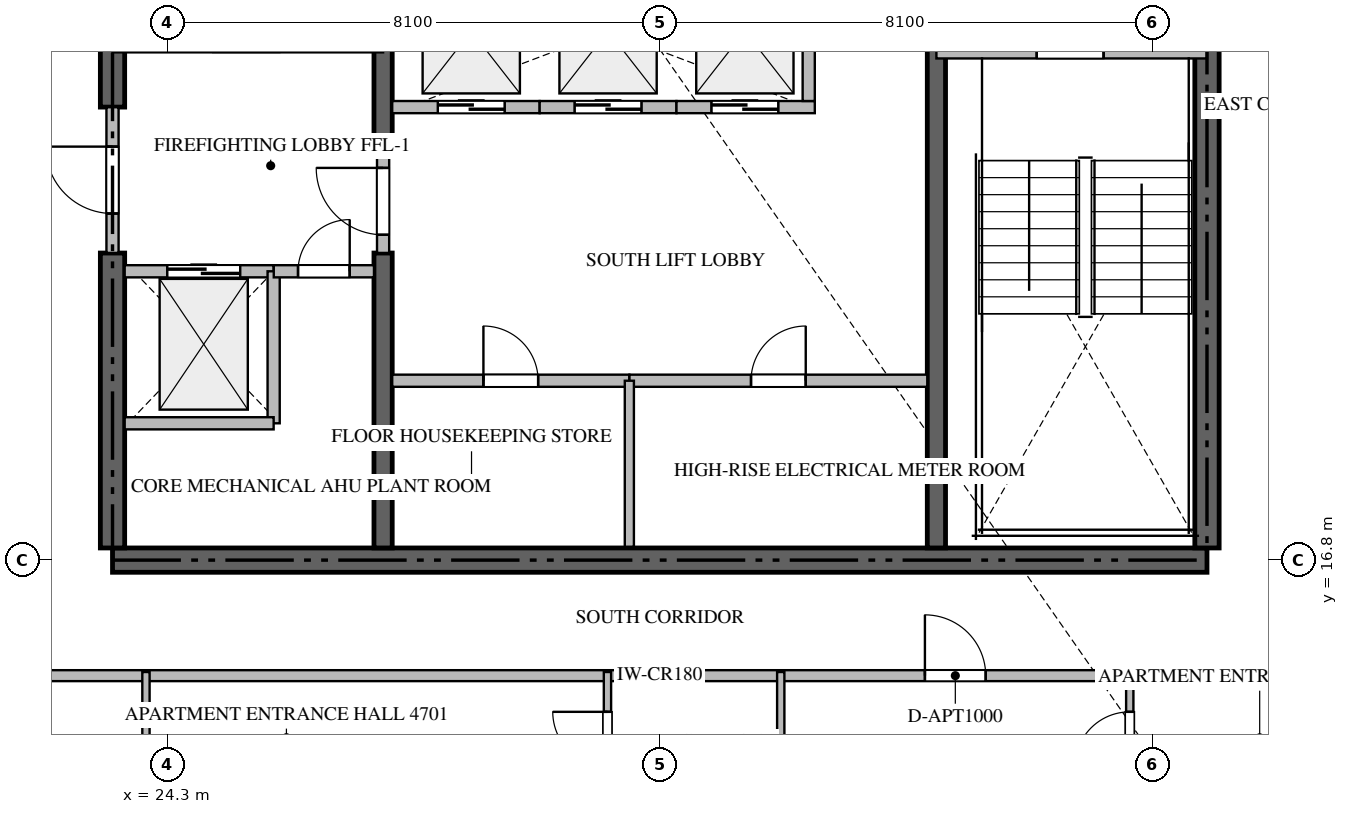
"""IFC4 building model, lengths in metres.
Left out: names, types, materials, properties, quantities, classifications, styles, units other than length and angle.
Written with IfcOpenShell. Run it as: python <this file> out.ifc"""

import sys

from ifc_helpers import new_model, si_unit, direction, frame, frame_2d, origin, place, context, subcontext, project, spatial, rectangle, extrude, source, transform, mapped, element, fill, save


model = new_model("IFC4")
c1 = context("Model", 3, precision=1e-05, world=origin(), true_north=direction((0.0, 1.0)))
c2 = subcontext(c1, "Body", "Model", "MODEL_VIEW")
j1 = project(units=[si_unit("LENGTHUNIT", "METRE"), si_unit("PLANEANGLEUNIT", "RADIAN")], contexts=[c1])
p1 = place(None, origin())
s1 = spatial("IfcSite", under=j1, at=p1, CompositionType="ELEMENT")
p2 = place(p1, origin())
s2 = spatial("IfcBuilding", under=s1, at=p2, CompositionType="ELEMENT")
p3 = place(p2, frame((0.0, 0.0, 187.65)))
s3 = spatial("IfcBuildingStorey", under=s2, at=p3, CompositionType="ELEMENT", Elevation=187.65)
p4 = place(p3, frame((23.4, 16.8, -0.26), z_axis=(0.0, 0.0, 1.0), x_axis=(1.0, 0.0, 0.0)))
e1 = element("IfcWall", 1, at=p4, inside=s3, PredefinedType="SHEAR", context=c2, shape_type="SweptSolid", body=[
    extrude(rectangle(XDim=18.0, YDim=0.4, at=frame_2d((9.0, 0.0))), origin(), (0.0, 0.0, 1.0), 3.748),
])
p5 = place(p3, frame((23.4, 17.0, -0.26), z_axis=(0.0, 0.0, 1.0), x_axis=(0.0, 1.0, 0.0)))
e2 = element("IfcWall", 2, at=p5, inside=s3, PredefinedType="SHEAR", context=c2, shape_type="SweptSolid", body=[
    extrude(rectangle(XDim=4.85, YDim=0.4, at=frame_2d((2.425, 0.0))), origin(), (0.0, 0.0, 1.0), 3.748),
])
p6 = place(p3, frame((23.4, 24.25, -0.26), z_axis=(0.0, 0.0, 1.0), x_axis=(0.0, 1.0, 0.0)))
e3 = element("IfcWall", 3, at=p6, inside=s3, PredefinedType="SHEAR", context=c2, shape_type="SweptSolid", body=[
    extrude(rectangle(XDim=9.15, YDim=0.4, at=frame_2d((4.575, 0.0))), origin(), (0.0, 0.0, 1.0), 3.748),
])
p7 = place(p3, frame((41.4, 17.0, -0.26), z_axis=(0.0, 0.0, 1.0), x_axis=(0.0, 1.0, 0.0)))
e4 = element("IfcWall", 4, at=p7, inside=s3, PredefinedType="SHEAR", context=c2, shape_type="SweptSolid", body=[
    extrude(rectangle(XDim=8.35, YDim=0.4, at=frame_2d((4.175, 0.0))), origin(), (0.0, 0.0, 1.0), 3.748),
])
p8 = place(p3, frame((27.85, 17.0, -0.26), z_axis=(0.0, 0.0, 1.0), x_axis=(0.0, 1.0, 0.0)))
e5 = element("IfcWall", 5, at=p8, inside=s3, PredefinedType="SHEAR", context=c2, shape_type="SweptSolid", body=[
    extrude(rectangle(XDim=4.85, YDim=0.3, at=frame_2d((2.425, 0.0))), origin(), (0.0, 0.0, 1.0), 3.748),
])
p9 = place(p3, frame((27.85, 23.55, -0.26), z_axis=(0.0, 0.0, 1.0), x_axis=(0.0, 1.0, 0.0)))
e6 = element("IfcWall", 6, at=p9, inside=s3, PredefinedType="SHEAR", context=c2, shape_type="SweptSolid", body=[
    extrude(rectangle(XDim=9.85, YDim=0.3, at=frame_2d((4.925, 0.0))), origin(), (0.0, 0.0, 1.0), 3.748),
])
p10 = place(p3, frame((36.95, 17.0, -0.26), z_axis=(0.0, 0.0, 1.0), x_axis=(0.0, 1.0, 0.0)))
e7 = element("IfcWall", 7, at=p10, inside=s3, PredefinedType="SHEAR", context=c2, shape_type="SweptSolid", body=[
    extrude(rectangle(XDim=8.35, YDim=0.3, at=frame_2d((4.175, 0.0))), origin(), (0.0, 0.0, 1.0), 3.748),
])
p11 = place(p3, frame((36.95, 25.15, 0.0), z_axis=(0.0, 0.0, 1.0), x_axis=(1.0, 0.0, 0.0)))
e8 = element("IfcWall", 8, at=p11, inside=s3, PredefinedType="STANDARD", context=c2, shape_type="SweptSolid", body=[
    extrude(rectangle(XDim=4.45, YDim=0.2, at=frame_2d((2.225, 0.0))), origin(), (0.0, 0.0, 1.0), 3.49),
])
p12 = place(p11, frame((1.65, 0.0, 0.0)))
e9 = element("IfcOpeningElement", 9, at=p12, cuts=e8, PredefinedType="OPENING", context=c2, shape_type="SweptSolid", body=[
    extrude(rectangle(XDim=1.1, YDim=2.15, at=frame_2d((0.55, 1.075))), frame((0.0, 0.11, 0.0), z_axis=(0.0, -1.0, 0.0), x_axis=(1.0, 0.0, 0.0)), (0.0, 0.0, 1.0), 0.22),
])
p13 = place(p3, frame((23.6, 21.55, 0.0), z_axis=(0.0, 0.0, 1.0), x_axis=(1.0, 0.0, 0.0)))
e10 = element("IfcWall", 10, at=p13, inside=s3, PredefinedType="STANDARD", context=c2, shape_type="SweptSolid", body=[
    extrude(rectangle(XDim=2.45, YDim=0.2, at=frame_2d((1.225, 0.0))), origin(), (0.0, 0.0, 1.0), 3.49),
])
p14 = place(p13, frame((0.7, 0.0, 0.0)))
e11 = element("IfcOpeningElement", 11, at=p14, cuts=e10, PredefinedType="OPENING", context=c2, shape_type="SweptSolid", body=[
    extrude(rectangle(XDim=1.2, YDim=2.2, at=frame_2d((0.6, 1.1))), frame((0.0, 0.11, 0.0), z_axis=(0.0, -1.0, 0.0), x_axis=(1.0, 0.0, 0.0)), (0.0, 0.0, 1.0), 0.22),
])
p15 = place(p3, frame((28.0, 24.25, 0.0), z_axis=(0.0, 0.0, 1.0), x_axis=(1.0, 0.0, 0.0)))
e12 = element("IfcWall", 12, at=p15, inside=s3, PredefinedType="STANDARD", context=c2, shape_type="SweptSolid", body=[
    extrude(rectangle(XDim=2.425, YDim=0.2, at=frame_2d((1.212, 0.0))), origin(), (0.0, 0.0, 1.0), 3.49),
])
p16 = place(p15, frame((0.75, 0.0, 0.0)))
e13 = element("IfcOpeningElement", 13, at=p16, cuts=e12, PredefinedType="OPENING", context=c2, shape_type="SweptSolid", body=[
    extrude(rectangle(XDim=1.1, YDim=2.2, at=frame_2d((0.55, 1.1))), frame((0.0, 0.11, 0.0), z_axis=(0.0, -1.0, 0.0), x_axis=(1.0, 0.0, 0.0)), (0.0, 0.0, 1.0), 0.22),
])
p17 = place(p3, frame((30.425, 24.25, 0.0), z_axis=(0.0, 0.0, 1.0), x_axis=(1.0, 0.0, 0.0)))
e14 = element("IfcWall", 14, at=p17, inside=s3, PredefinedType="STANDARD", context=c2, shape_type="SweptSolid", body=[
    extrude(rectangle(XDim=2.25, YDim=0.2, at=frame_2d((1.125, 0.0))), origin(), (0.0, 0.0, 1.0), 3.49),
])
p18 = place(p17, frame((0.575, 0.0, 0.0)))
e15 = element("IfcOpeningElement", 15, at=p18, cuts=e14, PredefinedType="OPENING", context=c2, shape_type="SweptSolid", body=[
    extrude(rectangle(XDim=1.1, YDim=2.2, at=frame_2d((0.55, 1.1))), frame((0.0, 0.11, 0.0), z_axis=(0.0, -1.0, 0.0), x_axis=(1.0, 0.0, 0.0)), (0.0, 0.0, 1.0), 0.22),
])
p19 = place(p3, frame((32.675, 24.25, 0.0), z_axis=(0.0, 0.0, 1.0), x_axis=(1.0, 0.0, 0.0)))
e16 = element("IfcWall", 16, at=p19, inside=s3, PredefinedType="STANDARD", context=c2, shape_type="SweptSolid", body=[
    extrude(rectangle(XDim=2.275, YDim=0.2, at=frame_2d((1.137, 0.0))), origin(), (0.0, 0.0, 1.0), 3.49),
])
p20 = place(p19, frame((0.575, 0.0, 0.0)))
e17 = element("IfcOpeningElement", 17, at=p20, cuts=e16, PredefinedType="OPENING", context=c2, shape_type="SweptSolid", body=[
    extrude(rectangle(XDim=1.1, YDim=2.2, at=frame_2d((0.55, 1.1))), frame((0.0, 0.11, 0.0), z_axis=(0.0, -1.0, 0.0), x_axis=(1.0, 0.0, 0.0)), (0.0, 0.0, 1.0), 0.22),
])
for number, where, z_axis, x_axis in (
    (18, (34.85, 24.35, 0.0), (0.0, 0.0, 1.0), (0.0, 1.0, 0.0)),
    (19, (26.05, 19.05, 0.0), (0.0, 0.0, 1.0), (0.0, 1.0, 0.0)),
):
    element("IfcWall", number, at=place(p3, frame(where, z_axis=z_axis, x_axis=x_axis)), inside=s3, PredefinedType="STANDARD", context=c2, shape_type="SweptSolid", body=[
        extrude(rectangle(XDim=2.5, YDim=0.2, at=frame_2d((1.25, 0.0))), origin(), (0.0, 0.0, 1.0), 3.49),
    ])
p21 = place(p3, frame((23.6, 19.05, 0.0), z_axis=(0.0, 0.0, 1.0), x_axis=(1.0, 0.0, 0.0)))
e20 = element("IfcWall", 20, at=p21, inside=s3, PredefinedType="STANDARD", context=c2, shape_type="SweptSolid", body=[
    extrude(rectangle(XDim=2.45, YDim=0.2, at=frame_2d((1.225, 0.0))), origin(), (0.0, 0.0, 1.0), 3.49),
])
p22 = place(p3, frame((26.052, 21.55, 0.0), z_axis=(0.0, 0.0, 1.0), x_axis=(1.0, 0.0, 0.0)))
e21 = element("IfcWall", 21, at=p22, inside=s3, PredefinedType="STANDARD", context=c2, shape_type="SweptSolid", body=[
    extrude(rectangle(XDim=1.648, YDim=0.2, at=frame_2d((0.824, 0.0))), origin(), (0.0, 0.0, 1.0), 3.49),
])
p23 = place(p22, frame((0.399, 0.0, 0.0)))
e22 = element("IfcOpeningElement", 22, at=p23, cuts=e21, PredefinedType="OPENING", context=c2, shape_type="SweptSolid", body=[
    extrude(rectangle(XDim=0.85, YDim=2.1, at=frame_2d((0.425, 1.05))), frame((0.0, 0.11, 0.0), z_axis=(0.0, -1.0, 0.0), x_axis=(1.0, 0.0, 0.0)), (0.0, 0.0, 1.0), 0.22),
])
p24 = place(p3, frame((23.4, 21.852, 0.0), z_axis=(0.0, 0.0, 1.0), x_axis=(0.0, 1.0, 0.0)))
e23 = element("IfcWall", 23, at=p24, inside=s3, PredefinedType="STANDARD", context=c2, shape_type="SweptSolid", body=[
    extrude(rectangle(XDim=2.396, YDim=0.2, at=frame_2d((1.198, 0.0))), origin(), (0.0, 0.0, 1.0), 3.49),
])
p25 = place(p24, frame((0.648, 0.0, 0.0)))
e24 = element("IfcOpeningElement", 24, at=p25, cuts=e23, PredefinedType="OPENING", context=c2, shape_type="SweptSolid", body=[
    extrude(rectangle(XDim=1.1, YDim=2.15, at=frame_2d((0.55, 1.075))), frame((0.0, 0.11, 0.0), z_axis=(0.0, -1.0, 0.0), x_axis=(1.0, 0.0, 0.0)), (0.0, 0.0, 1.0), 0.22),
])
p26 = place(p3, frame((27.85, 21.852, 0.0), z_axis=(0.0, 0.0, 1.0), x_axis=(0.0, 1.0, 0.0)))
e25 = element("IfcWall", 25, at=p26, inside=s3, PredefinedType="STANDARD", context=c2, shape_type="SweptSolid", body=[
    extrude(rectangle(XDim=1.696, YDim=0.2, at=frame_2d((0.848, 0.0))), origin(), (0.0, 0.0, 1.0), 3.49),
])
p27 = place(p26, frame((0.298, 0.0, 0.0)))
e26 = element("IfcOpeningElement", 26, at=p27, cuts=e25, PredefinedType="OPENING", context=c2, shape_type="SweptSolid", body=[
    extrude(rectangle(XDim=1.1, YDim=2.15, at=frame_2d((0.55, 1.075))), frame((0.0, 0.11, 0.0), z_axis=(0.0, -1.0, 0.0), x_axis=(1.0, 0.0, 0.0)), (0.0, 0.0, 1.0), 0.22),
])
p28 = place(p3, frame((28.0, 19.75, 0.0), z_axis=(0.0, 0.0, 1.0), x_axis=(1.0, 0.0, 0.0)))
e27 = element("IfcWall", 27, at=p28, inside=s3, PredefinedType="STANDARD", context=c2, shape_type="SweptSolid", body=[
    extrude(rectangle(XDim=3.9, YDim=0.2, at=frame_2d((1.95, 0.0))), origin(), (0.0, 0.0, 1.0), 3.49),
])
p29 = place(p28, frame((1.5, 0.0, 0.0)))
e28 = element("IfcOpeningElement", 28, at=p29, cuts=e27, PredefinedType="OPENING", context=c2, shape_type="SweptSolid", body=[
    extrude(rectangle(XDim=0.9, YDim=2.1, at=frame_2d((0.45, 1.05))), frame((0.0, 0.11, 0.0), z_axis=(0.0, -1.0, 0.0), x_axis=(1.0, 0.0, 0.0)), (0.0, 0.0, 1.0), 0.22),
])
p30 = place(p3, frame((31.902, 19.75, 0.0), z_axis=(0.0, 0.0, 1.0), x_axis=(1.0, 0.0, 0.0)))
e29 = element("IfcWall", 29, at=p30, inside=s3, PredefinedType="STANDARD", context=c2, shape_type="SweptSolid", body=[
    extrude(rectangle(XDim=4.898, YDim=0.2, at=frame_2d((2.449, 0.0))), origin(), (0.0, 0.0, 1.0), 3.49),
])
p31 = place(p30, frame((1.999, 0.0, 0.0)))
e30 = element("IfcOpeningElement", 30, at=p31, cuts=e29, PredefinedType="OPENING", context=c2, shape_type="SweptSolid", body=[
    extrude(rectangle(XDim=0.9, YDim=2.1, at=frame_2d((0.45, 1.05))), frame((0.0, 0.11, 0.0), z_axis=(0.0, -1.0, 0.0), x_axis=(1.0, 0.0, 0.0)), (0.0, 0.0, 1.0), 0.22),
])
p32 = place(p3, frame((31.9, 17.02, 0.0), z_axis=(0.0, 0.0, 1.0), x_axis=(0.0, 1.0, 0.0)))
e31 = element("IfcWall", 31, at=p32, inside=s3, PredefinedType="PARTITIONING", context=c2, shape_type="SweptSolid", body=[
    extrude(rectangle(XDim=2.73, YDim=0.15, at=frame_2d((1.365, 0.0))), origin(), (0.0, 0.0, 1.0), 3.49),
])
p33 = place(p3, frame((20.952, 14.9, 0.0), z_axis=(0.0, 0.0, 1.0), x_axis=(1.0, 0.0, 0.0)))
e32 = element("IfcWall", 32, at=p33, inside=s3, PredefinedType="PARTITIONING", context=c2, shape_type="SweptSolid", body=[
    extrude(rectangle(XDim=22.896, YDim=0.18, at=frame_2d((11.448, 0.0))), origin(), (0.0, 0.0, 1.0), 3.49),
])
p34 = place(p33, frame((15.809, 0.0, 0.0)))
e33 = element("IfcOpeningElement", 33, at=p34, cuts=e32, PredefinedType="OPENING", context=c2, shape_type="SweptSolid", body=[
    extrude(rectangle(XDim=1.0, YDim=2.15, at=frame_2d((0.5, 1.075))), frame((0.0, 0.1, 0.0), z_axis=(0.0, -1.0, 0.0), x_axis=(1.0, 0.0, 0.0)), (0.0, 0.0, 1.0), 0.2),
])
p35 = place(p3, frame((34.39, 12.15, 0.0), z_axis=(0.0, 0.0, 1.0), x_axis=(0.0, 1.0, 0.0)))
e34 = element("IfcWall", 34, at=p35, inside=s3, PredefinedType="PARTITIONING", context=c2, shape_type="SweptSolid", body=[
    extrude(rectangle(XDim=2.81, YDim=0.12, at=frame_2d((1.405, 0.0))), origin(), (0.0, 0.0, 1.0), 3.49),
])
p36 = place(p3, frame((31.54, 12.75, 0.0), z_axis=(0.0, 0.0, 1.0), x_axis=(0.0, 1.0, 0.0)))
e35 = element("IfcWall", 35, at=p36, inside=s3, PredefinedType="PARTITIONING", context=c2, shape_type="SweptSolid", body=[
    extrude(rectangle(XDim=2.21, YDim=0.12, at=frame_2d((1.105, 0.0))), origin(), (0.0, 0.0, 1.0), 3.49),
])
p37 = place(p36, frame((0.655, 0.0, 0.0)))
e36 = element("IfcOpeningElement", 36, at=p37, cuts=e35, PredefinedType="OPENING", context=c2, shape_type="SweptSolid", body=[
    extrude(rectangle(XDim=0.9, YDim=2.1, at=frame_2d((0.45, 1.05))), frame((0.0, 0.07, 0.0), z_axis=(0.0, -1.0, 0.0), x_axis=(1.0, 0.0, 0.0)), (0.0, 0.0, 1.0), 0.14),
])
p38 = place(p3, frame((23.95, 12.752, 0.0), z_axis=(0.0, 0.0, 1.0), x_axis=(0.0, 1.0, 0.0)))
e37 = element("IfcWall", 37, at=p38, inside=s3, PredefinedType="PARTITIONING", context=c2, shape_type="SweptSolid", body=[
    extrude(rectangle(XDim=2.208, YDim=0.12, at=frame_2d((1.104, 0.0))), origin(), (0.0, 0.0, 1.0), 3.49),
])
p39 = place(p3, frame((40.13, 12.75, 0.0), z_axis=(0.0, 0.0, 1.0), x_axis=(0.0, 1.0, 0.0)))
e38 = element("IfcWall", 38, at=p39, inside=s3, PredefinedType="PARTITIONING", context=c2, shape_type="SweptSolid", body=[
    extrude(rectangle(XDim=2.21, YDim=0.12, at=frame_2d((1.105, 0.0))), origin(), (0.0, 0.0, 1.0), 3.49),
])
p40 = place(p39, frame((0.655, 0.0, 0.0)))
e39 = element("IfcOpeningElement", 39, at=p40, cuts=e38, PredefinedType="OPENING", context=c2, shape_type="SweptSolid", body=[
    extrude(rectangle(XDim=0.9, YDim=2.1, at=frame_2d((0.45, 1.05))), frame((0.0, 0.07, 0.0), z_axis=(0.0, -1.0, 0.0), x_axis=(1.0, 0.0, 0.0)), (0.0, 0.0, 1.0), 0.14),
])
m1 = source(origin(), c2, "Body", "SweptSolid", [
    extrude(rectangle(XDim=1.1, YDim=2.15, at=frame_2d((0.55, 1.075))), frame((0.0, 0.025, 0.0), z_axis=(0.0, -1.0, 0.0), x_axis=(1.0, 0.0, 0.0)), (0.0, 0.0, 1.0), 0.05),
])
p41 = place(p12, origin())
e40 = element("IfcDoor", 40, at=p41, inside=s3, OperationType="SINGLE_SWING_RIGHT", PredefinedType="DOOR", context=c2, shape_type="MappedRepresentation", body=[
    mapped(m1, transform((0.0, 0.0, 0.0), scale=1.0)),
])
fill(e9, e40)
m2 = source(origin(), c2, "Body", "SweptSolid", [
    extrude(rectangle(XDim=1.2, YDim=2.2, at=frame_2d((0.6, 1.1))), frame((0.0, 0.025, 0.0), z_axis=(0.0, -1.0, 0.0), x_axis=(1.0, 0.0, 0.0)), (0.0, 0.0, 1.0), 0.05),
])
p42 = place(p14, origin())
e41 = element("IfcDoor", 41, at=p42, inside=s3, OperationType="DOUBLE_DOOR_SLIDING", PredefinedType="DOOR", context=c2, shape_type="MappedRepresentation", body=[
    mapped(m2, transform((0.0, 0.0, 0.0), scale=1.0)),
])
fill(e11, e41)
m3 = source(origin(), c2, "Body", "SweptSolid", [
    extrude(rectangle(XDim=1.1, YDim=2.2, at=frame_2d((0.55, 1.1))), frame((0.0, 0.025, 0.0), z_axis=(0.0, -1.0, 0.0), x_axis=(1.0, 0.0, 0.0)), (0.0, 0.0, 1.0), 0.05),
])
p43 = place(p16, origin())
e42 = element("IfcDoor", 42, at=p43, inside=s3, OperationType="DOUBLE_DOOR_SLIDING", PredefinedType="DOOR", context=c2, shape_type="MappedRepresentation", body=[
    mapped(m3, transform((0.0, 0.0, 0.0), scale=1.0)),
])
fill(e13, e42)
p44 = place(p18, origin())
e43 = element("IfcDoor", 43, at=p44, inside=s3, OperationType="DOUBLE_DOOR_SLIDING", PredefinedType="DOOR", context=c2, shape_type="MappedRepresentation", body=[
    mapped(m3, transform((0.0, 0.0, 0.0), scale=1.0)),
])
fill(e15, e43)
p45 = place(p20, origin())
e44 = element("IfcDoor", 44, at=p45, inside=s3, OperationType="DOUBLE_DOOR_SLIDING", PredefinedType="DOOR", context=c2, shape_type="MappedRepresentation", body=[
    mapped(m3, transform((0.0, 0.0, 0.0), scale=1.0)),
])
fill(e17, e44)
m4 = source(origin(), c2, "Body", "SweptSolid", [
    extrude(rectangle(XDim=0.85, YDim=2.1, at=frame_2d((0.425, 1.05))), frame((0.0, 0.025, 0.0), z_axis=(0.0, -1.0, 0.0), x_axis=(1.0, 0.0, 0.0)), (0.0, 0.0, 1.0), 0.05),
])
p46 = place(p23, origin())
e45 = element("IfcDoor", 45, at=p46, inside=s3, OperationType="SINGLE_SWING_RIGHT", PredefinedType="DOOR", context=c2, shape_type="MappedRepresentation", body=[
    mapped(m4, transform((0.0, 0.0, 0.0), scale=1.0)),
])
fill(e22, e45)
p47 = place(p25, origin())
e46 = element("IfcDoor", 46, at=p47, inside=s3, OperationType="SINGLE_SWING_RIGHT", PredefinedType="DOOR", context=c2, shape_type="MappedRepresentation", body=[
    mapped(m1, transform((0.0, 0.0, 0.0), scale=1.0)),
])
fill(e24, e46)
p48 = place(p27, origin())
e47 = element("IfcDoor", 47, at=p48, inside=s3, OperationType="SINGLE_SWING_RIGHT", PredefinedType="DOOR", context=c2, shape_type="MappedRepresentation", body=[
    mapped(m1, transform((0.0, 0.0, 0.0), scale=1.0)),
])
fill(e26, e47)
m5 = source(origin(), c2, "Body", "SweptSolid", [
    extrude(rectangle(XDim=0.9, YDim=2.1, at=frame_2d((0.45, 1.05))), frame((0.0, 0.025, 0.0), z_axis=(0.0, -1.0, 0.0), x_axis=(1.0, 0.0, 0.0)), (0.0, 0.0, 1.0), 0.05),
])
p49 = place(p29, origin())
e48 = element("IfcDoor", 48, at=p49, inside=s3, OperationType="SINGLE_SWING_LEFT", PredefinedType="DOOR", context=c2, shape_type="MappedRepresentation", body=[
    mapped(m5, transform((0.0, 0.0, 0.0), scale=1.0)),
])
fill(e28, e48)
p50 = place(p31, origin())
e49 = element("IfcDoor", 49, at=p50, inside=s3, OperationType="SINGLE_SWING_RIGHT", PredefinedType="DOOR", context=c2, shape_type="MappedRepresentation", body=[
    mapped(m5, transform((0.0, 0.0, 0.0), scale=1.0)),
])
fill(e30, e49)
m6 = source(origin(), c2, "Body", "SweptSolid", [
    extrude(rectangle(XDim=1.0, YDim=2.15, at=frame_2d((0.5, 1.075))), frame((0.0, 0.025, 0.0), z_axis=(0.0, -1.0, 0.0), x_axis=(1.0, 0.0, 0.0)), (0.0, 0.0, 1.0), 0.05),
])
p51 = place(p34, origin())
e50 = element("IfcDoor", 50, at=p51, inside=s3, OperationType="SINGLE_SWING_LEFT", PredefinedType="DOOR", context=c2, shape_type="MappedRepresentation", body=[
    mapped(m6, transform((0.0, 0.0, 0.0), scale=1.0)),
])
fill(e33, e50)
p52 = place(p37, origin())
e51 = element("IfcDoor", 51, at=p52, inside=s3, OperationType="SINGLE_SWING_RIGHT", PredefinedType="DOOR", context=c2, shape_type="MappedRepresentation", body=[
    mapped(m5, transform((0.0, 0.0, 0.0), scale=1.0)),
])
fill(e36, e51)
p53 = place(p40, origin())
e52 = element("IfcDoor", 52, at=p53, inside=s3, OperationType="SINGLE_SWING_LEFT", PredefinedType="DOOR", context=c2, shape_type="MappedRepresentation", body=[
    mapped(m5, transform((0.0, 0.0, 0.0), scale=1.0)),
])
fill(e39, e52)
save(model, sys.argv[1])
